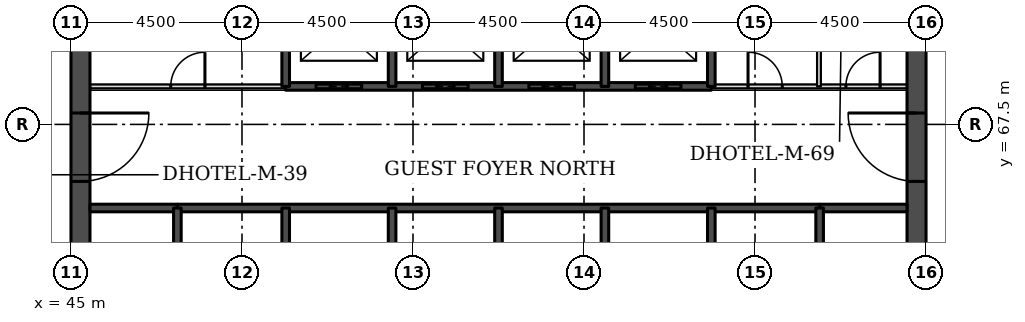
"""IFC4 building model, lengths in metres.
Left out: names, types, materials, properties, quantities, classifications, styles, units other than length and angle.
Written with IfcOpenShell. Run it as: python <this file> out.ifc"""

import sys

from ifc_helpers import new_model, si_unit, direction, frame, frame_2d, origin, place, context, subcontext, project, spatial, rectangle, extrude, element, fill, save


model = new_model("IFC4")
c1 = context("Model", 3, precision=1e-05, world=origin(), true_north=direction((0.0, 1.0)))
c2 = subcontext(c1, "Body", "Model", "MODEL_VIEW")
j1 = project(units=[si_unit("LENGTHUNIT", "METRE"), si_unit("PLANEANGLEUNIT", "RADIAN")], contexts=[c1])
p1 = place(None, origin())
s1 = spatial("IfcSite", under=j1, at=p1, CompositionType="ELEMENT")
p2 = place(p1, origin())
s2 = spatial("IfcBuilding", under=s1, at=p2, CompositionType="ELEMENT")
p3 = place(p2, frame((0.0, 0.0, 23.1)))
s3 = spatial("IfcBuildingStorey", under=s2, at=p3, CompositionType="ELEMENT", Elevation=23.1)
p4 = place(p3, frame((45.25, 49.5, 0.0), z_axis=(0.0, 0.0, 1.0), x_axis=(0.0, 1.0, 0.0)))
e1 = element("IfcWall", 1, at=p4, inside=s3, PredefinedType="SHEAR", context=c2, shape_type="SweptSolid", body=[
    extrude(rectangle(XDim=22.5, YDim=0.5, at=frame_2d((11.25, 0.0))), origin(), (0.0, 0.0, 1.0), 3.3),
])
p5 = place(p4, frame((4.2, 0.0, 0.0)))
e2 = element("IfcOpeningElement", 2, at=p5, cuts=e1, PredefinedType="OPENING", context=c2, shape_type="SweptSolid", body=[
    extrude(rectangle(XDim=1.8, YDim=2.1, at=frame_2d((0.9, 1.05))), frame((0.0, 0.26, 0.0), z_axis=(0.0, -1.0, 0.0), x_axis=(1.0, 0.0, 0.0)), (0.0, 0.0, 1.0), 0.52),
])
p6 = place(p4, frame((6.9, 0.0, 0.0)))
e3 = element("IfcOpeningElement", 3, at=p6, cuts=e1, PredefinedType="OPENING", context=c2, shape_type="SweptSolid", body=[
    extrude(rectangle(XDim=1.1, YDim=2.1, at=frame_2d((0.55, 1.05))), frame((0.0, 0.26, 0.0), z_axis=(0.0, -1.0, 0.0), x_axis=(1.0, 0.0, 0.0)), (0.0, 0.0, 1.0), 0.52),
])
p7 = place(p4, frame((13.6, 0.0, 0.0)))
e4 = element("IfcOpeningElement", 4, at=p7, cuts=e1, PredefinedType="OPENING", context=c2, shape_type="SweptSolid", body=[
    extrude(rectangle(XDim=1.1, YDim=2.1, at=frame_2d((0.55, 1.05))), frame((0.0, 0.26, 0.0), z_axis=(0.0, -1.0, 0.0), x_axis=(1.0, 0.0, 0.0)), (0.0, 0.0, 1.0), 0.52),
])
p8 = place(p4, frame((16.5, 0.0, 0.0)))
e5 = element("IfcOpeningElement", 5, at=p8, cuts=e1, PredefinedType="OPENING", context=c2, shape_type="SweptSolid", body=[
    extrude(rectangle(XDim=1.8, YDim=2.1, at=frame_2d((0.9, 1.05))), frame((0.0, 0.26, 0.0), z_axis=(0.0, -1.0, 0.0), x_axis=(1.0, 0.0, 0.0)), (0.0, 0.0, 1.0), 0.52),
])
p9 = place(p3, frame((67.25, 49.5, 0.0), z_axis=(0.0, 0.0, 1.0), x_axis=(0.0, 1.0, 0.0)))
e6 = element("IfcWall", 6, at=p9, inside=s3, PredefinedType="SHEAR", context=c2, shape_type="SweptSolid", body=[
    extrude(rectangle(XDim=22.5, YDim=0.5, at=frame_2d((11.25, 0.0))), origin(), (0.0, 0.0, 1.0), 3.3),
])
p10 = place(p9, frame((4.2, 0.0, 0.0)))
e7 = element("IfcOpeningElement", 7, at=p10, cuts=e6, PredefinedType="OPENING", context=c2, shape_type="SweptSolid", body=[
    extrude(rectangle(XDim=1.8, YDim=2.1, at=frame_2d((0.9, 1.05))), frame((0.0, 0.26, 0.0), z_axis=(0.0, -1.0, 0.0), x_axis=(1.0, 0.0, 0.0)), (0.0, 0.0, 1.0), 0.52),
])
p11 = place(p9, frame((6.9, 0.0, 0.0)))
e8 = element("IfcOpeningElement", 8, at=p11, cuts=e6, PredefinedType="OPENING", context=c2, shape_type="SweptSolid", body=[
    extrude(rectangle(XDim=1.1, YDim=2.1, at=frame_2d((0.55, 1.05))), frame((0.0, 0.26, 0.0), z_axis=(0.0, -1.0, 0.0), x_axis=(1.0, 0.0, 0.0)), (0.0, 0.0, 1.0), 0.52),
])
p12 = place(p9, frame((13.6, 0.0, 0.0)))
e9 = element("IfcOpeningElement", 9, at=p12, cuts=e6, PredefinedType="OPENING", context=c2, shape_type="SweptSolid", body=[
    extrude(rectangle(XDim=1.1, YDim=2.1, at=frame_2d((0.55, 1.05))), frame((0.0, 0.26, 0.0), z_axis=(0.0, -1.0, 0.0), x_axis=(1.0, 0.0, 0.0)), (0.0, 0.0, 1.0), 0.52),
])
p13 = place(p9, frame((16.5, 0.0, 0.0)))
e10 = element("IfcOpeningElement", 10, at=p13, cuts=e6, PredefinedType="OPENING", context=c2, shape_type="SweptSolid", body=[
    extrude(rectangle(XDim=1.8, YDim=2.1, at=frame_2d((0.9, 1.05))), frame((0.0, 0.26, 0.0), z_axis=(0.0, -1.0, 0.0), x_axis=(1.0, 0.0, 0.0)), (0.0, 0.0, 1.0), 0.52),
])
for number, where, z_axis, x_axis in (
    (11, (45.5, 65.3, 0.0), (0.0, 0.0, 1.0), (1.0, 0.0, 0.0)),
    (12, (64.7, 65.3, 0.0), (0.0, 0.0, 1.0), (1.0, 0.0, 0.0)),
):
    element("IfcWall", number, at=place(p3, frame(where, z_axis=z_axis, x_axis=x_axis)), inside=s3, PredefinedType="SOLIDWALL", context=c2, shape_type="SweptSolid", body=[
        extrude(rectangle(XDim=2.3, YDim=0.2, at=frame_2d((1.15, 0.0))), origin(), (0.0, 0.0, 1.0), 3.08),
    ])
p14 = place(p3, frame((47.8, 65.3, 0.0), z_axis=(0.0, 0.0, 1.0), x_axis=(1.0, 0.0, 0.0)))
e13 = element("IfcWall", 13, at=p14, inside=s3, PredefinedType="SOLIDWALL", context=c2, shape_type="SweptSolid", body=[
    extrude(rectangle(XDim=16.9, YDim=0.2, at=frame_2d((8.45, 0.0))), origin(), (0.0, 0.0, 1.0), 3.08),
])
p15 = place(p3, frame((45.5, 68.5, 0.0), z_axis=(0.0, 0.0, 1.0), x_axis=(1.0, 0.0, 0.0)))
e14 = element("IfcWall", 14, at=p15, inside=s3, PredefinedType="PARTITIONING", context=c2, shape_type="SweptSolid", body=[
    extrude(rectangle(XDim=5.15, YDim=0.1, at=frame_2d((2.575, 0.0))), origin(), (0.0, 0.0, 1.0), 3.08),
])
p16 = place(p15, frame((2.125, 0.0, 0.0)))
e15 = element("IfcOpeningElement", 15, at=p16, cuts=e14, PredefinedType="OPENING", context=c2, shape_type="SweptSolid", body=[
    extrude(rectangle(XDim=0.9, YDim=2.1, at=frame_2d((0.45, 1.05))), frame((0.0, 0.06, 0.0), z_axis=(0.0, -1.0, 0.0), x_axis=(1.0, 0.0, 0.0)), (0.0, 0.0, 1.0), 0.12),
])
p17 = place(p3, frame((61.85, 68.5, 0.0), z_axis=(0.0, 0.0, 1.0), x_axis=(1.0, 0.0, 0.0)))
e16 = element("IfcWall", 16, at=p17, inside=s3, PredefinedType="PARTITIONING", context=c2, shape_type="SweptSolid", body=[
    extrude(rectangle(XDim=5.15, YDim=0.1, at=frame_2d((2.575, 0.0))), origin(), (0.0, 0.0, 1.0), 3.08),
])
p18 = place(p17, frame((3.541, 0.0, 0.0)))
e17 = element("IfcOpeningElement", 17, at=p18, cuts=e16, PredefinedType="OPENING", context=c2, shape_type="SweptSolid", body=[
    extrude(rectangle(XDim=0.9, YDim=2.1, at=frame_2d((0.45, 1.05))), frame((0.0, 0.06, 0.0), z_axis=(0.0, -1.0, 0.0), x_axis=(1.0, 0.0, 0.0)), (0.0, 0.0, 1.0), 0.12),
])
p19 = place(p17, frame((0.966, 0.0, 0.0)))
e18 = element("IfcOpeningElement", 18, at=p19, cuts=e16, PredefinedType="OPENING", context=c2, shape_type="SweptSolid", body=[
    extrude(rectangle(XDim=0.9, YDim=2.1, at=frame_2d((0.45, 1.05))), frame((0.0, 0.06, 0.0), z_axis=(0.0, -1.0, 0.0), x_axis=(1.0, 0.0, 0.0)), (0.0, 0.0, 1.0), 0.12),
])
p20 = place(p3, frame((50.65, 68.5, 0.0), z_axis=(0.0, 0.0, 1.0), x_axis=(1.0, 0.0, 0.0)))
e19 = element("IfcWall", 19, at=p20, inside=s3, PredefinedType="SOLIDWALL", context=c2, shape_type="SweptSolid", body=[
    extrude(rectangle(XDim=11.2, YDim=0.2, at=frame_2d((5.6, 0.0))), origin(), (0.0, 0.0, 1.0), 3.08),
])
p21 = place(p20, frame((0.8, 0.0, 0.0)))
e20 = element("IfcOpeningElement", 20, at=p21, cuts=e19, PredefinedType="OPENING", context=c2, shape_type="SweptSolid", body=[
    extrude(rectangle(XDim=1.2, YDim=2.1, at=frame_2d((0.6, 1.05))), frame((0.0, 0.11, 0.0), z_axis=(0.0, -1.0, 0.0), x_axis=(1.0, 0.0, 0.0)), (0.0, 0.0, 1.0), 0.22),
])
p22 = place(p20, frame((3.6, 0.0, 0.0)))
e21 = element("IfcOpeningElement", 21, at=p22, cuts=e19, PredefinedType="OPENING", context=c2, shape_type="SweptSolid", body=[
    extrude(rectangle(XDim=1.2, YDim=2.1, at=frame_2d((0.6, 1.05))), frame((0.0, 0.11, 0.0), z_axis=(0.0, -1.0, 0.0), x_axis=(1.0, 0.0, 0.0)), (0.0, 0.0, 1.0), 0.22),
])
p23 = place(p20, frame((6.4, 0.0, 0.0)))
e22 = element("IfcOpeningElement", 22, at=p23, cuts=e19, PredefinedType="OPENING", context=c2, shape_type="SweptSolid", body=[
    extrude(rectangle(XDim=1.2, YDim=2.1, at=frame_2d((0.6, 1.05))), frame((0.0, 0.11, 0.0), z_axis=(0.0, -1.0, 0.0), x_axis=(1.0, 0.0, 0.0)), (0.0, 0.0, 1.0), 0.22),
])
p24 = place(p20, frame((9.2, 0.0, 0.0)))
e23 = element("IfcOpeningElement", 23, at=p24, cuts=e19, PredefinedType="OPENING", context=c2, shape_type="SweptSolid", body=[
    extrude(rectangle(XDim=1.2, YDim=2.1, at=frame_2d((0.6, 1.05))), frame((0.0, 0.11, 0.0), z_axis=(0.0, -1.0, 0.0), x_axis=(1.0, 0.0, 0.0)), (0.0, 0.0, 1.0), 0.22),
])
p25 = place(p3, frame((47.8, 62.0, 0.0), z_axis=(0.0, 0.0, 1.0), x_axis=(0.0, 1.0, 0.0)))
e24 = element("IfcWall", 24, at=p25, inside=s3, PredefinedType="SOLIDWALL", context=c2, shape_type="SweptSolid", body=[
    extrude(rectangle(XDim=3.3, YDim=0.2, at=frame_2d((1.65, 0.0))), origin(), (0.0, 0.0, 1.0), 3.08),
])
p26 = place(p25, frame((1.1, 0.0, 0.0)))
e25 = element("IfcOpeningElement", 25, at=p26, cuts=e24, PredefinedType="OPENING", context=c2, shape_type="SweptSolid", body=[
    extrude(rectangle(XDim=1.1, YDim=2.1, at=frame_2d((0.55, 1.05))), frame((0.0, 0.11, 0.0), z_axis=(0.0, -1.0, 0.0), x_axis=(1.0, 0.0, 0.0)), (0.0, 0.0, 1.0), 0.22),
])
p27 = place(p3, frame((50.65, 62.0, 0.0), z_axis=(0.0, 0.0, 1.0), x_axis=(0.0, 1.0, 0.0)))
e26 = element("IfcWall", 26, at=p27, inside=s3, PredefinedType="SOLIDWALL", context=c2, shape_type="SweptSolid", body=[
    extrude(rectangle(XDim=3.3, YDim=0.2, at=frame_2d((1.65, 0.0))), origin(), (0.0, 0.0, 1.0), 3.08),
])
p28 = place(p3, frame((50.65, 68.5, 0.0), z_axis=(0.0, 0.0, 1.0), x_axis=(0.0, 1.0, 0.0)))
e27 = element("IfcWall", 27, at=p28, inside=s3, PredefinedType="SOLIDWALL", context=c2, shape_type="SweptSolid", body=[
    extrude(rectangle(XDim=3.0, YDim=0.2, at=frame_2d((1.5, 0.0))), origin(), (0.0, 0.0, 1.0), 3.08),
])
p29 = place(p3, frame((53.45, 62.5, 0.0), z_axis=(0.0, 0.0, 1.0), x_axis=(0.0, 1.0, 0.0)))
e28 = element("IfcWall", 28, at=p29, inside=s3, PredefinedType="SOLIDWALL", context=c2, shape_type="SweptSolid", body=[
    extrude(rectangle(XDim=2.8, YDim=0.2, at=frame_2d((1.4, 0.0))), origin(), (0.0, 0.0, 1.0), 3.08),
])
p30 = place(p3, frame((53.45, 68.5, 0.0), z_axis=(0.0, 0.0, 1.0), x_axis=(0.0, 1.0, 0.0)))
e29 = element("IfcWall", 29, at=p30, inside=s3, PredefinedType="SOLIDWALL", context=c2, shape_type="SweptSolid", body=[
    extrude(rectangle(XDim=3.0, YDim=0.2, at=frame_2d((1.5, 0.0))), origin(), (0.0, 0.0, 1.0), 3.08),
])
p31 = place(p3, frame((56.25, 62.5, 0.0), z_axis=(0.0, 0.0, 1.0), x_axis=(0.0, 1.0, 0.0)))
e30 = element("IfcWall", 30, at=p31, inside=s3, PredefinedType="SOLIDWALL", context=c2, shape_type="SweptSolid", body=[
    extrude(rectangle(XDim=2.8, YDim=0.2, at=frame_2d((1.4, 0.0))), origin(), (0.0, 0.0, 1.0), 3.08),
])
p32 = place(p3, frame((56.25, 68.5, 0.0), z_axis=(0.0, 0.0, 1.0), x_axis=(0.0, 1.0, 0.0)))
e31 = element("IfcWall", 31, at=p32, inside=s3, PredefinedType="SOLIDWALL", context=c2, shape_type="SweptSolid", body=[
    extrude(rectangle(XDim=3.0, YDim=0.2, at=frame_2d((1.5, 0.0))), origin(), (0.0, 0.0, 1.0), 3.08),
])
p33 = place(p3, frame((59.05, 62.5, 0.0), z_axis=(0.0, 0.0, 1.0), x_axis=(0.0, 1.0, 0.0)))
e32 = element("IfcWall", 32, at=p33, inside=s3, PredefinedType="SOLIDWALL", context=c2, shape_type="SweptSolid", body=[
    extrude(rectangle(XDim=2.8, YDim=0.2, at=frame_2d((1.4, 0.0))), origin(), (0.0, 0.0, 1.0), 3.08),
])
p34 = place(p3, frame((59.05, 68.5, 0.0), z_axis=(0.0, 0.0, 1.0), x_axis=(0.0, 1.0, 0.0)))
e33 = element("IfcWall", 33, at=p34, inside=s3, PredefinedType="SOLIDWALL", context=c2, shape_type="SweptSolid", body=[
    extrude(rectangle(XDim=3.0, YDim=0.2, at=frame_2d((1.5, 0.0))), origin(), (0.0, 0.0, 1.0), 3.08),
])
p35 = place(p3, frame((61.85, 62.0, 0.0), z_axis=(0.0, 0.0, 1.0), x_axis=(0.0, 1.0, 0.0)))
e34 = element("IfcWall", 34, at=p35, inside=s3, PredefinedType="SOLIDWALL", context=c2, shape_type="SweptSolid", body=[
    extrude(rectangle(XDim=3.3, YDim=0.2, at=frame_2d((1.65, 0.0))), origin(), (0.0, 0.0, 1.0), 3.08),
])
p36 = place(p3, frame((61.85, 68.5, 0.0), z_axis=(0.0, 0.0, 1.0), x_axis=(0.0, 1.0, 0.0)))
e35 = element("IfcWall", 35, at=p36, inside=s3, PredefinedType="SOLIDWALL", context=c2, shape_type="SweptSolid", body=[
    extrude(rectangle(XDim=3.0, YDim=0.2, at=frame_2d((1.5, 0.0))), origin(), (0.0, 0.0, 1.0), 3.08),
])
p37 = place(p3, frame((64.683, 68.5, 0.0), z_axis=(0.0, 0.0, 1.0), x_axis=(0.0, 1.0, 0.0)))
e36 = element("IfcWall", 36, at=p37, inside=s3, PredefinedType="PARTITIONING", context=c2, shape_type="SweptSolid", body=[
    extrude(rectangle(XDim=3.0, YDim=0.1, at=frame_2d((1.5, 0.0))), origin(), (0.0, 0.0, 1.0), 3.08),
])
p38 = place(p3, frame((64.7, 62.0, 0.0), z_axis=(0.0, 0.0, 1.0), x_axis=(0.0, 1.0, 0.0)))
e37 = element("IfcWall", 37, at=p38, inside=s3, PredefinedType="SOLIDWALL", context=c2, shape_type="SweptSolid", body=[
    extrude(rectangle(XDim=3.3, YDim=0.2, at=frame_2d((1.65, 0.0))), origin(), (0.0, 0.0, 1.0), 3.08),
])
p39 = place(p38, frame((1.1, 0.0, 0.0)))
e38 = element("IfcOpeningElement", 38, at=p39, cuts=e37, PredefinedType="OPENING", context=c2, shape_type="SweptSolid", body=[
    extrude(rectangle(XDim=1.1, YDim=2.1, at=frame_2d((0.55, 1.05))), frame((0.0, 0.11, 0.0), z_axis=(0.0, -1.0, 0.0), x_axis=(1.0, 0.0, 0.0)), (0.0, 0.0, 1.0), 0.22),
])
p40 = place(p21, origin())
e39 = element("IfcDoor", 39, at=p40, inside=s3, OperationType="DOUBLE_DOOR_SLIDING", PredefinedType="DOOR", context=c2, shape_type="SweptSolid", body=[
    extrude(rectangle(XDim=1.2, YDim=2.1, at=frame_2d((0.6, 1.05))), frame((0.0, 0.025, 0.0), z_axis=(0.0, -1.0, 0.0), x_axis=(1.0, 0.0, 0.0)), (0.0, 0.0, 1.0), 0.05),
])
fill(e20, e39)
p41 = place(p22, origin())
e40 = element("IfcDoor", 40, at=p41, inside=s3, OperationType="DOUBLE_DOOR_SLIDING", PredefinedType="DOOR", context=c2, shape_type="SweptSolid", body=[
    extrude(rectangle(XDim=1.2, YDim=2.1, at=frame_2d((0.6, 1.05))), frame((0.0, 0.025, 0.0), z_axis=(0.0, -1.0, 0.0), x_axis=(1.0, 0.0, 0.0)), (0.0, 0.0, 1.0), 0.05),
])
fill(e21, e40)
p42 = place(p23, origin())
e41 = element("IfcDoor", 41, at=p42, inside=s3, OperationType="DOUBLE_DOOR_SLIDING", PredefinedType="DOOR", context=c2, shape_type="SweptSolid", body=[
    extrude(rectangle(XDim=1.2, YDim=2.1, at=frame_2d((0.6, 1.05))), frame((0.0, 0.025, 0.0), z_axis=(0.0, -1.0, 0.0), x_axis=(1.0, 0.0, 0.0)), (0.0, 0.0, 1.0), 0.05),
])
fill(e22, e41)
p43 = place(p24, origin())
e42 = element("IfcDoor", 42, at=p43, inside=s3, OperationType="DOUBLE_DOOR_SLIDING", PredefinedType="DOOR", context=c2, shape_type="SweptSolid", body=[
    extrude(rectangle(XDim=1.2, YDim=2.1, at=frame_2d((0.6, 1.05))), frame((0.0, 0.025, 0.0), z_axis=(0.0, -1.0, 0.0), x_axis=(1.0, 0.0, 0.0)), (0.0, 0.0, 1.0), 0.05),
])
fill(e23, e42)
p44 = place(p8, frame((1.8, 0.0, 0.0), z_axis=(0.0, 0.0, 1.0), x_axis=(-1.0, 0.0, 0.0)))
e43 = element("IfcDoor", 43, at=p44, inside=s3, OperationType="SINGLE_SWING_LEFT", PredefinedType="DOOR", context=c2, shape_type="SweptSolid", body=[
    extrude(rectangle(XDim=1.8, YDim=2.1, at=frame_2d((0.9, 1.05))), frame((0.0, 0.025, 0.0), z_axis=(0.0, -1.0, 0.0), x_axis=(1.0, 0.0, 0.0)), (0.0, 0.0, 1.0), 0.05),
])
fill(e5, e43)
p45 = place(p13, origin())
e44 = element("IfcDoor", 44, at=p45, inside=s3, OperationType="SINGLE_SWING_RIGHT", PredefinedType="DOOR", context=c2, shape_type="SweptSolid", body=[
    extrude(rectangle(XDim=1.8, YDim=2.1, at=frame_2d((0.9, 1.05))), frame((0.0, 0.025, 0.0), z_axis=(0.0, -1.0, 0.0), x_axis=(1.0, 0.0, 0.0)), (0.0, 0.0, 1.0), 0.05),
])
fill(e10, e44)
p46 = place(p18, origin())
e45 = element("IfcDoor", 45, at=p46, inside=s3, OperationType="SINGLE_SWING_RIGHT", PredefinedType="DOOR", context=c2, shape_type="SweptSolid", body=[
    extrude(rectangle(XDim=0.9, YDim=2.1, at=frame_2d((0.45, 1.05))), frame((0.0, 0.025, 0.0), z_axis=(0.0, -1.0, 0.0), x_axis=(1.0, 0.0, 0.0)), (0.0, 0.0, 1.0), 0.05),
])
fill(e17, e45)
p47 = place(p19, origin())
e46 = element("IfcDoor", 46, at=p47, inside=s3, OperationType="SINGLE_SWING_LEFT", PredefinedType="DOOR", context=c2, shape_type="SweptSolid", body=[
    extrude(rectangle(XDim=0.9, YDim=2.1, at=frame_2d((0.45, 1.05))), frame((0.0, 0.025, 0.0), z_axis=(0.0, -1.0, 0.0), x_axis=(1.0, 0.0, 0.0)), (0.0, 0.0, 1.0), 0.05),
])
fill(e18, e46)
p48 = place(p16, origin())
e47 = element("IfcDoor", 47, at=p48, inside=s3, OperationType="SINGLE_SWING_RIGHT", PredefinedType="DOOR", context=c2, shape_type="SweptSolid", body=[
    extrude(rectangle(XDim=0.9, YDim=2.1, at=frame_2d((0.45, 1.05))), frame((0.0, 0.025, 0.0), z_axis=(0.0, -1.0, 0.0), x_axis=(1.0, 0.0, 0.0)), (0.0, 0.0, 1.0), 0.05),
])
fill(e15, e47)
save(model, sys.argv[1])
